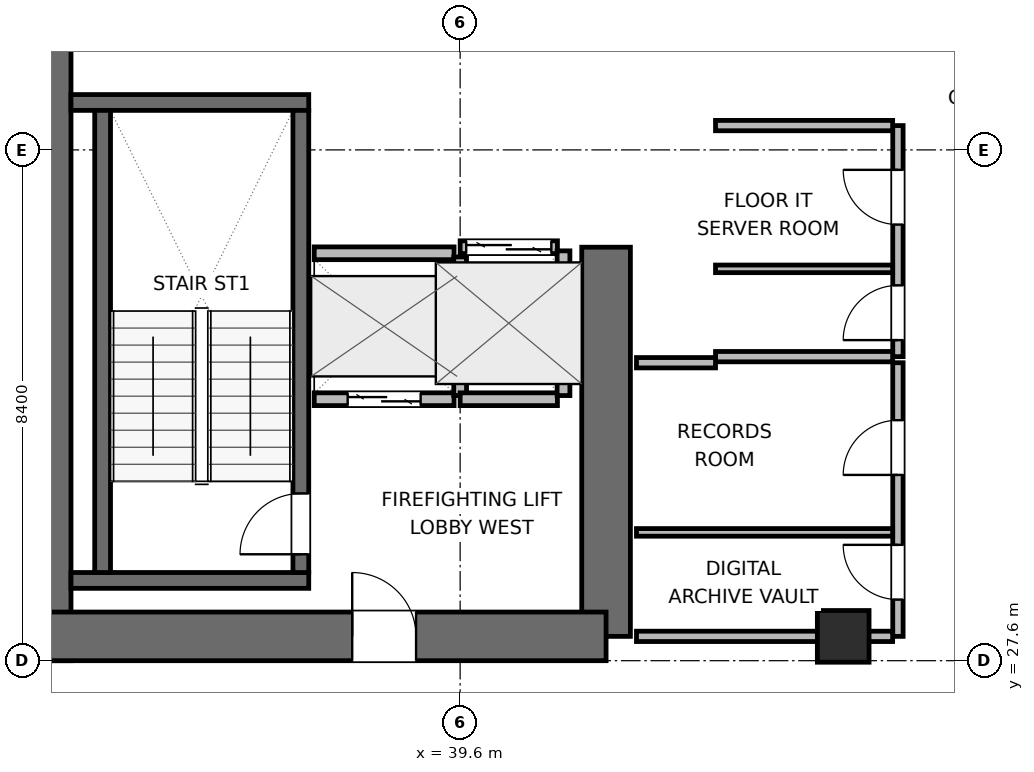
"""IFC4 building model, lengths in metres.
Left out: names, types, materials, properties, quantities, classifications, styles, units other than length and angle.
Written with IfcOpenShell. Run it as: python <this file> out.ifc"""

import sys

from ifc_helpers import new_model, si_unit, direction, frame, frame_2d, origin, origin_2d, place, context, subcontext, project, spatial, rectangle, extrude, element, fill, save


model = new_model("IFC4")
c1 = context("Model", 3, precision=1e-05, world=origin(), true_north=direction((0.0, 1.0)))
c2 = subcontext(c1, "Body", "Model", "MODEL_VIEW")
j1 = project(units=[si_unit("LENGTHUNIT", "METRE"), si_unit("PLANEANGLEUNIT", "RADIAN")], contexts=[c1])
p1 = place(None, origin())
s1 = spatial("IfcSite", under=j1, at=p1, CompositionType="ELEMENT")
p2 = place(p1, origin())
s2 = spatial("IfcBuilding", under=s1, at=p2, CompositionType="ELEMENT")
p3 = place(p2, frame((0.0, 0.0, 162.3)))
s3 = spatial("IfcBuildingStorey", under=s2, at=p3, CompositionType="ELEMENT", Elevation=162.3)
p4 = place(p3, frame((32.8, 27.6, 0.0), z_axis=(0.0, 0.0, 1.0), x_axis=(0.0, 1.0, 0.0)))
e1 = element("IfcWall", 1, at=p4, inside=s3, PredefinedType="SHEAR", context=c2, shape_type="SweptSolid", body=[
    extrude(rectangle(XDim=16.8, YDim=0.8, at=frame_2d((8.4, 0.0))), origin(), (0.0, 0.0, 1.0), 3.9),
])
p5 = place(p3, frame((42.0, 28.0, 0.0), z_axis=(0.0, 0.0, 1.0), x_axis=(0.0, 1.0, 0.0)))
e2 = element("IfcWall", 2, at=p5, inside=s3, PredefinedType="SHEAR", context=c2, shape_type="SweptSolid", body=[
    extrude(rectangle(XDim=6.4, YDim=0.8, at=frame_2d((3.2, 0.0))), origin(), (0.0, 0.0, 1.0), 3.9),
])
p6 = place(p3, frame((32.8, 28.0, 0.0), z_axis=(0.0, 0.0, 1.0), x_axis=(1.0, 0.0, 0.0)))
e3 = element("IfcWall", 3, at=p6, inside=s3, PredefinedType="SHEAR", context=c2, shape_type="SweptSolid", body=[
    extrude(rectangle(XDim=9.2, YDim=0.8, at=frame_2d((4.6, 0.0))), origin(), (0.0, 0.0, 1.0), 3.9),
])
p7 = place(p6, frame((5.025, 0.0, 0.0)))
e4 = element("IfcOpeningElement", 4, at=p7, cuts=e3, PredefinedType="OPENING", context=c2, shape_type="SweptSolid", body=[
    extrude(rectangle(XDim=1.05, YDim=2.04, at=frame_2d((0.525, 1.02))), frame((0.0, 0.41, 0.0), z_axis=(0.0, -1.0, 0.0), x_axis=(1.0, 0.0, 0.0)), (0.0, 0.0, 1.0), 0.82),
])
for number, where, z_axis, x_axis in (
    (5, (33.2, 28.92, 0.0), (0.0, 0.0, 1.0), (1.0, 0.0, 0.0)),
    (6, (33.2, 36.78, 0.0), (0.0, 0.0, 1.0), (1.0, 0.0, 0.0)),
):
    element("IfcWall", number, at=place(p3, frame(where, z_axis=z_axis, x_axis=x_axis)), inside=s3, PredefinedType="SHEAR", context=c2, shape_type="SweptSolid", body=[
        extrude(rectangle(XDim=3.91, YDim=0.26, at=frame_2d((1.955, 0.0))), origin(), (0.0, 0.0, 1.0), 3.9),
    ])
p8 = place(p3, frame((33.72, 29.05, 0.0), z_axis=(0.0, 0.0, 1.0), x_axis=(0.0, 1.0, 0.0)))
e7 = element("IfcWall", 7, at=p8, inside=s3, PredefinedType="SHEAR", context=c2, shape_type="SweptSolid", body=[
    extrude(rectangle(XDim=7.6, YDim=0.26, at=frame_2d((3.8, 0.0))), origin(), (0.0, 0.0, 1.0), 3.9),
])
p9 = place(p3, frame((36.98, 29.05, 0.0), z_axis=(0.0, 0.0, 1.0), x_axis=(0.0, 1.0, 0.0)))
e8 = element("IfcWall", 8, at=p9, inside=s3, PredefinedType="SHEAR", context=c2, shape_type="SweptSolid", body=[
    extrude(rectangle(XDim=7.6, YDim=0.26, at=frame_2d((3.8, 0.0))), origin(), (0.0, 0.0, 1.0), 3.9),
])
p10 = place(p9, frame((0.3, 0.0, 0.0)))
e9 = element("IfcOpeningElement", 9, at=p10, cuts=e8, PredefinedType="OPENING", context=c2, shape_type="SweptSolid", body=[
    extrude(rectangle(XDim=1.0, YDim=2.04, at=frame_2d((0.5, 1.02))), frame((0.0, 0.14, 0.0), z_axis=(0.0, -1.0, 0.0), x_axis=(1.0, 0.0, 0.0)), (0.0, 0.0, 1.0), 0.28),
])
p11 = place(p3, frame((45.9, 28.0, 0.0), z_axis=(0.0, 0.0, 1.0), x_axis=(1.0, 0.0, 0.0)))
e10 = element("IfcColumn", 10, at=p11, inside=s3, PredefinedType="COLUMN", context=c2, shape_type="SweptSolid", body=[
    extrude(rectangle(XDim=0.85, YDim=0.85, at=origin_2d()), origin(), (0.0, 0.0, 1.0), 3.9),
])
p12 = place(p3, frame((37.2, 31.9, 0.0), z_axis=(0.0, 0.0, 1.0), x_axis=(1.0, 0.0, 0.0)))
e11 = element("IfcWall", 11, at=p12, inside=s3, PredefinedType="PARTITIONING", context=c2, shape_type="SweptSolid", body=[
    extrude(rectangle(XDim=2.3, YDim=0.21, at=frame_2d((1.15, 0.0))), origin(), (0.0, 0.0, 1.0), 3.68),
])
p13 = place(p12, frame((0.55, 0.0, 0.0)))
e12 = element("IfcOpeningElement", 12, at=p13, cuts=e11, PredefinedType="OPENING", context=c2, shape_type="SweptSolid", body=[
    extrude(rectangle(XDim=1.2, YDim=2.04, at=frame_2d((0.6, 1.02))), frame((0.0, 0.115, 0.0), z_axis=(0.0, -1.0, 0.0), x_axis=(1.0, 0.0, 0.0)), (0.0, 0.0, 1.0), 0.23),
])
p14 = place(p3, frame((37.2, 34.3, 0.0), z_axis=(0.0, 0.0, 1.0), x_axis=(1.0, 0.0, 0.0)))
e13 = element("IfcWall", 13, at=p14, inside=s3, PredefinedType="PARTITIONING", context=c2, shape_type="SweptSolid", body=[
    extrude(rectangle(XDim=2.3, YDim=0.21, at=frame_2d((1.15, 0.0))), origin(), (0.0, 0.0, 1.0), 3.68),
])
p15 = place(p3, frame((39.6, 31.96, 0.0), z_axis=(0.0, 0.0, 1.0), x_axis=(0.0, 1.0, 0.0)))
e14 = element("IfcWall", 14, at=p15, inside=s3, PredefinedType="PARTITIONING", context=c2, shape_type="SweptSolid", body=[
    extrude(rectangle(XDim=2.28, YDim=0.21, at=frame_2d((1.14, 0.0))), origin(), (0.0, 0.0, 1.0), 3.68),
])
p16 = place(p3, frame((39.6, 34.4, 0.0), z_axis=(0.0, 0.0, 1.0), x_axis=(1.0, 0.0, 0.0)))
e15 = element("IfcWall", 15, at=p16, inside=s3, PredefinedType="PARTITIONING", context=c2, shape_type="SweptSolid", body=[
    extrude(rectangle(XDim=1.6, YDim=0.21, at=frame_2d((0.8, 0.0))), origin(), (0.0, 0.0, 1.0), 3.68),
])
p17 = place(p16, frame((0.1, 0.0, 0.0)))
e16 = element("IfcOpeningElement", 16, at=p17, cuts=e15, PredefinedType="OPENING", context=c2, shape_type="SweptSolid", body=[
    extrude(rectangle(XDim=1.4, YDim=2.06, at=frame_2d((0.7, 1.03))), frame((0.0, 0.115, 0.0), z_axis=(0.0, -1.0, 0.0), x_axis=(1.0, 0.0, 0.0)), (0.0, 0.0, 1.0), 0.23),
])
p18 = place(p3, frame((39.6, 31.9, 0.0), z_axis=(0.0, 0.0, 1.0), x_axis=(1.0, 0.0, 0.0)))
e17 = element("IfcWall", 17, at=p18, inside=s3, PredefinedType="PARTITIONING", context=c2, shape_type="SweptSolid", body=[
    extrude(rectangle(XDim=1.6, YDim=0.21, at=frame_2d((0.8, 0.0))), origin(), (0.0, 0.0, 1.0), 3.68),
])
p19 = place(p3, frame((41.3, 31.96, 0.0), z_axis=(0.0, 0.0, 1.0), x_axis=(0.0, 1.0, 0.0)))
e18 = element("IfcWall", 18, at=p19, inside=s3, PredefinedType="PARTITIONING", context=c2, shape_type="SweptSolid", body=[
    extrude(rectangle(XDim=2.38, YDim=0.21, at=frame_2d((1.19, 0.0))), origin(), (0.0, 0.0, 1.0), 3.68),
])
p20 = place(p3, frame((46.8, 32.6, 0.0), z_axis=(0.0, 0.0, 1.0), x_axis=(0.0, 1.0, 0.0)))
e19 = element("IfcWall", 19, at=p20, inside=s3, PredefinedType="PARTITIONING", context=c2, shape_type="SweptSolid", body=[
    extrude(rectangle(XDim=3.8, YDim=0.17, at=frame_2d((1.9, 0.0))), origin(), (0.0, 0.0, 1.0), 3.68),
])
p21 = place(p20, frame((0.272, 0.0, 0.0)))
e20 = element("IfcOpeningElement", 20, at=p21, cuts=e19, PredefinedType="OPENING", context=c2, shape_type="SweptSolid", body=[
    extrude(rectangle(XDim=0.9, YDim=2.02, at=frame_2d((0.45, 1.01))), frame((0.0, 0.095, 0.0), z_axis=(0.0, -1.0, 0.0), x_axis=(1.0, 0.0, 0.0)), (0.0, 0.0, 1.0), 0.19),
])
p22 = place(p20, frame((2.172, 0.0, 0.0)))
e21 = element("IfcOpeningElement", 21, at=p22, cuts=e19, PredefinedType="OPENING", context=c2, shape_type="SweptSolid", body=[
    extrude(rectangle(XDim=0.9, YDim=2.02, at=frame_2d((0.45, 1.01))), frame((0.0, 0.095, 0.0), z_axis=(0.0, -1.0, 0.0), x_axis=(1.0, 0.0, 0.0)), (0.0, 0.0, 1.0), 0.19),
])
for number, where, z_axis, x_axis in (
    (22, (43.8, 32.6, 0.0), (0.0, 0.0, 1.0), (1.0, 0.0, 0.0)),
    (23, (43.8, 36.4, 0.0), (0.0, 0.0, 1.0), (1.0, 0.0, 0.0)),
):
    element("IfcWall", number, at=place(p3, frame(where, z_axis=z_axis, x_axis=x_axis)), inside=s3, PredefinedType="PARTITIONING", context=c2, shape_type="SweptSolid", body=[
        extrude(rectangle(XDim=2.913, YDim=0.17, at=frame_2d((1.457, 0.0))), origin(), (0.0, 0.0, 1.0), 3.68),
    ])
p23 = place(p3, frame((43.8, 34.044, 0.0), z_axis=(0.0, 0.0, 1.0), x_axis=(1.0, 0.0, 0.0)))
e24 = element("IfcWall", 24, at=p23, inside=s3, PredefinedType="PARTITIONING", context=c2, shape_type="SweptSolid", body=[
    extrude(rectangle(XDim=2.913, YDim=0.125, at=frame_2d((1.457, 0.0))), origin(), (0.0, 0.0, 1.0), 3.68),
])
p24 = place(p3, frame((46.8, 28.0, 0.0), z_axis=(0.0, 0.0, 1.0), x_axis=(0.0, 1.0, 0.0)))
e25 = element("IfcWall", 25, at=p24, inside=s3, PredefinedType="PARTITIONING", context=c2, shape_type="SweptSolid", body=[
    extrude(rectangle(XDim=4.5, YDim=0.17, at=frame_2d((2.25, 0.0))), origin(), (0.0, 0.0, 1.0), 3.68),
])
p25 = place(p24, frame((0.605, 0.0, 0.0)))
e26 = element("IfcOpeningElement", 26, at=p25, cuts=e25, PredefinedType="OPENING", context=c2, shape_type="SweptSolid", body=[
    extrude(rectangle(XDim=0.9, YDim=2.02, at=frame_2d((0.45, 1.01))), frame((0.0, 0.095, 0.0), z_axis=(0.0, -1.0, 0.0), x_axis=(1.0, 0.0, 0.0)), (0.0, 0.0, 1.0), 0.19),
])
p26 = place(p24, frame((2.655, 0.0, 0.0)))
e27 = element("IfcOpeningElement", 27, at=p26, cuts=e25, PredefinedType="OPENING", context=c2, shape_type="SweptSolid", body=[
    extrude(rectangle(XDim=0.9, YDim=2.02, at=frame_2d((0.45, 1.01))), frame((0.0, 0.095, 0.0), z_axis=(0.0, -1.0, 0.0), x_axis=(1.0, 0.0, 0.0)), (0.0, 0.0, 1.0), 0.19),
])
p27 = place(p3, frame((42.5, 28.0, 0.0), z_axis=(0.0, 0.0, 1.0), x_axis=(1.0, 0.0, 0.0)))
e28 = element("IfcWall", 28, at=p27, inside=s3, PredefinedType="PARTITIONING", context=c2, shape_type="SweptSolid", body=[
    extrude(rectangle(XDim=4.213, YDim=0.17, at=frame_2d((2.106, 0.0))), origin(), (0.0, 0.0, 1.0), 2.765),
])
p28 = place(p3, frame((42.5, 32.5, 0.0), z_axis=(0.0, 0.0, 1.0), x_axis=(1.0, 0.0, 0.0)))
e29 = element("IfcWall", 29, at=p28, inside=s3, PredefinedType="PARTITIONING", context=c2, shape_type="SweptSolid", body=[
    extrude(rectangle(XDim=1.3, YDim=0.17, at=frame_2d((0.65, 0.0))), origin(), (0.0, 0.0, 1.0), 3.68),
])
p29 = place(p3, frame((42.5, 29.71, 0.0), z_axis=(0.0, 0.0, 1.0), x_axis=(1.0, 0.0, 0.0)))
e30 = element("IfcWall", 30, at=p29, inside=s3, PredefinedType="PARTITIONING", context=c2, shape_type="SweptSolid", body=[
    extrude(rectangle(XDim=4.213, YDim=0.125, at=frame_2d((2.106, 0.0))), origin(), (0.0, 0.0, 1.0), 3.68),
])
p30 = place(p10, origin())
e31 = element("IfcDoor", 31, at=p30, inside=s3, OperationType="SINGLE_SWING_LEFT", PredefinedType="DOOR", context=c2, shape_type="SweptSolid", body=[
    extrude(rectangle(XDim=1.0, YDim=2.04, at=frame_2d((0.5, 1.02))), frame((0.0, 0.025, 0.0), z_axis=(0.0, -1.0, 0.0), x_axis=(1.0, 0.0, 0.0)), (0.0, 0.0, 1.0), 0.05),
])
fill(e9, e31)
p31 = place(p13, origin())
e32 = element("IfcDoor", 32, at=p31, inside=s3, OperationType="DOUBLE_DOOR_SLIDING", PredefinedType="DOOR", context=c2, shape_type="SweptSolid", body=[
    extrude(rectangle(XDim=1.2, YDim=2.04, at=frame_2d((0.6, 1.02))), frame((0.0, 0.025, 0.0), z_axis=(0.0, -1.0, 0.0), x_axis=(1.0, 0.0, 0.0)), (0.0, 0.0, 1.0), 0.05),
])
fill(e12, e32)
p32 = place(p17, origin())
e33 = element("IfcDoor", 33, at=p32, inside=s3, OperationType="DOUBLE_DOOR_SLIDING", PredefinedType="DOOR", context=c2, shape_type="SweptSolid", body=[
    extrude(rectangle(XDim=1.4, YDim=2.06, at=frame_2d((0.7, 1.03))), frame((0.0, 0.025, 0.0), z_axis=(0.0, -1.0, 0.0), x_axis=(1.0, 0.0, 0.0)), (0.0, 0.0, 1.0), 0.05),
])
fill(e16, e33)
p33 = place(p7, origin())
e34 = element("IfcDoor", 34, at=p33, inside=s3, OperationType="SINGLE_SWING_LEFT", PredefinedType="DOOR", context=c2, shape_type="SweptSolid", body=[
    extrude(rectangle(XDim=1.05, YDim=2.04, at=frame_2d((0.525, 1.02))), frame((0.0, 0.025, 0.0), z_axis=(0.0, -1.0, 0.0), x_axis=(1.0, 0.0, 0.0)), (0.0, 0.0, 1.0), 0.05),
])
fill(e4, e34)
p34 = place(p21, origin())
e35 = element("IfcDoor", 35, at=p34, inside=s3, OperationType="SINGLE_SWING_LEFT", PredefinedType="DOOR", context=c2, shape_type="SweptSolid", body=[
    extrude(rectangle(XDim=0.9, YDim=2.02, at=frame_2d((0.45, 1.01))), frame((0.0, 0.025, 0.0), z_axis=(0.0, -1.0, 0.0), x_axis=(1.0, 0.0, 0.0)), (0.0, 0.0, 1.0), 0.05),
])
fill(e20, e35)
p35 = place(p22, origin())
e36 = element("IfcDoor", 36, at=p35, inside=s3, OperationType="SINGLE_SWING_RIGHT", PredefinedType="DOOR", context=c2, shape_type="SweptSolid", body=[
    extrude(rectangle(XDim=0.9, YDim=2.02, at=frame_2d((0.45, 1.01))), frame((0.0, 0.025, 0.0), z_axis=(0.0, -1.0, 0.0), x_axis=(1.0, 0.0, 0.0)), (0.0, 0.0, 1.0), 0.05),
])
fill(e21, e36)
p36 = place(p25, origin())
e37 = element("IfcDoor", 37, at=p36, inside=s3, OperationType="SINGLE_SWING_RIGHT", PredefinedType="DOOR", context=c2, shape_type="SweptSolid", body=[
    extrude(rectangle(XDim=0.9, YDim=2.02, at=frame_2d((0.45, 1.01))), frame((0.0, 0.025, 0.0), z_axis=(0.0, -1.0, 0.0), x_axis=(1.0, 0.0, 0.0)), (0.0, 0.0, 1.0), 0.05),
])
fill(e26, e37)
p37 = place(p26, origin())
e38 = element("IfcDoor", 38, at=p37, inside=s3, OperationType="SINGLE_SWING_LEFT", PredefinedType="DOOR", context=c2, shape_type="SweptSolid", body=[
    extrude(rectangle(XDim=0.9, YDim=2.02, at=frame_2d((0.45, 1.01))), frame((0.0, 0.025, 0.0), z_axis=(0.0, -1.0, 0.0), x_axis=(1.0, 0.0, 0.0)), (0.0, 0.0, 1.0), 0.05),
])
fill(e27, e38)
save(model, sys.argv[1])
